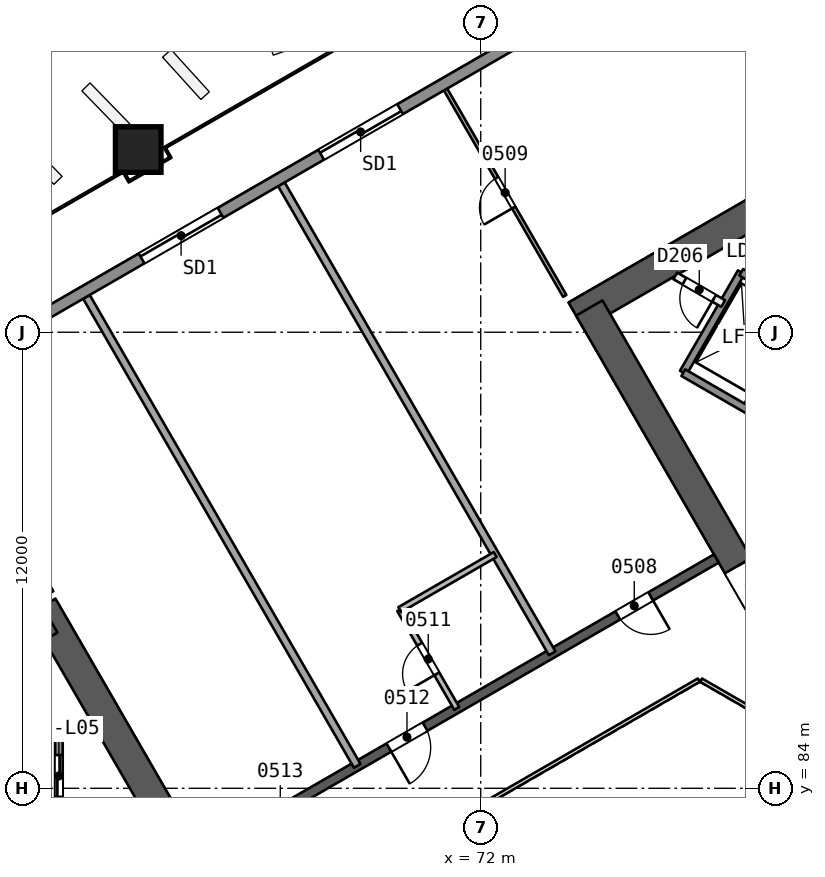
"""IFC4 building model, lengths in metres.
Left out: names, types, materials, properties, quantities, classifications, styles, units other than length and angle.
Written with IfcOpenShell. Run it as: python <this file> out.ifc"""

import sys

from ifc_helpers import new_model, si_unit, direction, frame, frame_2d, origin, origin_2d, place, context, subcontext, project, spatial, rectangle, extrude, element, fill, save


model = new_model("IFC4")
c1 = context("Model", 3, precision=1e-05, world=origin(), true_north=direction((0.0, 1.0)))
c2 = subcontext(c1, "Body", "Model", "MODEL_VIEW")
j1 = project(units=[si_unit("LENGTHUNIT", "METRE"), si_unit("PLANEANGLEUNIT", "RADIAN")], contexts=[c1])
p1 = place(None, origin())
s1 = spatial("IfcSite", under=j1, at=p1, CompositionType="ELEMENT")
p2 = place(p1, origin())
s2 = spatial("IfcBuilding", under=s1, at=p2, CompositionType="ELEMENT")
p3 = place(p2, frame((0.0, 0.0, 30.0)))
s3 = spatial("IfcBuildingStorey", under=s2, at=p3, CompositionType="ELEMENT", Elevation=30.0)
p4 = place(p3, frame((65.538, 80.0, 0.0), z_axis=(0.0, 0.0, 1.0), x_axis=(-0.49999662545, 0.866027352073, 0.0)))
e1 = element("IfcWall", 1, at=p4, inside=s3, PredefinedType="SHEAR", context=c2, shape_type="SweptSolid", body=[
    extrude(rectangle(XDim=10.149, YDim=0.8, at=frame_2d((5.074, 0.0))), origin(), (0.0, 0.0, 1.0), 3.7),
])
p5 = place(p4, frame((0.719, 0.0, 0.0)))
e2 = element("IfcOpeningElement", 2, at=p5, cuts=e1, PredefinedType="OPENING", context=c2, shape_type="SweptSolid", body=[
    extrude(rectangle(XDim=1.2, YDim=2.1, at=frame_2d((0.6, 1.05))), frame((0.0, 0.411, 0.0), z_axis=(0.0, -1.0, 0.0), x_axis=(1.0, 0.0, 0.0)), (0.0, 0.0, 1.0), 0.821),
])
p6 = place(p3, frame((60.664, 88.443, 0.0), z_axis=(0.0, 0.0, 1.0), x_axis=(-0.866029478545, -0.499992942241, 0.0)))
e3 = element("IfcWall", 3, at=p6, inside=s3, PredefinedType="SHEAR", context=c2, shape_type="SweptSolid", body=[
    extrude(rectangle(XDim=13.933, YDim=0.8, at=frame_2d((6.967, 0.0))), origin(), (0.0, 0.0, 1.0), 3.7),
])
p7 = place(p3, frame((86.723, 103.488, 0.0), z_axis=(0.0, 0.0, 1.0), x_axis=(-0.866032504327, -0.499987701298, 0.0)))
e4 = element("IfcWall", 4, at=p7, inside=s3, PredefinedType="SHEAR", context=c2, shape_type="SweptSolid", body=[
    extrude(rectangle(XDim=14.102, YDim=0.8, at=frame_2d((7.051, 0.0))), origin(), (0.0, 0.0, 1.0), 3.7),
])
p8 = place(p3, frame((74.856, 96.637, 0.0), z_axis=(0.0, 0.0, 1.0), x_axis=(0.499993500917, -0.866029155999, 0.0)))
e5 = element("IfcWall", 5, at=p8, inside=s3, PredefinedType="SHEAR", context=c2, shape_type="SweptSolid", body=[
    extrude(rectangle(XDim=9.98, YDim=0.8, at=frame_2d((4.99, 0.0))), origin(), (0.0, 0.0, 1.0), 3.7),
])
p9 = place(p8, frame((7.83, 0.0, 0.0)))
e6 = element("IfcOpeningElement", 6, at=p9, cuts=e5, PredefinedType="OPENING", context=c2, shape_type="SweptSolid", body=[
    extrude(rectangle(XDim=1.2, YDim=2.1, at=frame_2d((0.6, 1.05))), frame((0.0, 0.411, 0.0), z_axis=(0.0, -1.0, 0.0), x_axis=(1.0, 0.0, 0.0)), (0.0, 0.0, 1.0), 0.821),
])
p10 = place(p3, frame((78.2, 90.046, 0.0), z_axis=(0.0, 0.0, 1.0), x_axis=(-0.866026492143, -0.499998114903, 0.0)))
e7 = element("IfcWall", 7, at=p10, inside=s3, PredefinedType="SHEAR", context=c2, shape_type="SweptSolid", body=[
    extrude(rectangle(XDim=15.588, YDim=0.25, at=frame_2d((7.794, 0.0))), origin(), (0.0, 0.0, 1.0), 3.2),
])
p11 = place(p10, frame((1.994, 0.0, 0.0)))
e8 = element("IfcOpeningElement", 8, at=p11, cuts=e7, PredefinedType="OPENING", context=c2, shape_type="SweptSolid", body=[
    extrude(rectangle(XDim=1.0, YDim=2.1, at=frame_2d((0.5, 1.05))), frame((0.0, 0.135, 0.0), z_axis=(0.0, -1.0, 0.0), x_axis=(1.0, 0.0, 0.0)), (0.0, 0.0, 1.0), 0.271),
])
p12 = place(p10, frame((8.85, 0.0, 0.0)))
e9 = element("IfcOpeningElement", 9, at=p12, cuts=e7, PredefinedType="OPENING", context=c2, shape_type="SweptSolid", body=[
    extrude(rectangle(XDim=1.1, YDim=2.1, at=frame_2d((0.55, 1.05))), frame((0.0, 0.135, 0.0), z_axis=(0.0, -1.0, 0.0), x_axis=(1.0, 0.0, 0.0)), (0.0, 0.0, 1.0), 0.271),
])
p13 = place(p10, frame((12.75, 0.0, 0.0)))
e10 = element("IfcOpeningElement", 10, at=p13, cuts=e7, PredefinedType="OPENING", context=c2, shape_type="SweptSolid", body=[
    extrude(rectangle(XDim=1.0, YDim=2.1, at=frame_2d((0.5, 1.05))), frame((0.0, 0.135, 0.0), z_axis=(0.0, -1.0, 0.0), x_axis=(1.0, 0.0, 0.0)), (0.0, 0.0, 1.0), 0.271),
])
p14 = place(p3, frame((62.975, 100.828, 0.0), z_axis=(0.010093620709, -0.017482414954, 0.999796221231), x_axis=(-0.499897086036, 0.865849517735, 0.020187025824)))
e11 = element("IfcColumn", 11, at=p14, inside=s3, PredefinedType="COLUMN", context=c2, shape_type="SweptSolid", body=[
    extrude(rectangle(XDim=1.2, YDim=1.2, at=origin_2d()), origin(), (0.0, 0.0, 1.0), 3.701),
])
p15 = place(p3, frame((74.21, 96.956, 0.0), z_axis=(0.0, 0.0, 1.0), x_axis=(-0.499986391729, 0.866033260381, 0.0)))
e12 = element("IfcWall", 12, at=p15, inside=s3, PredefinedType="PARTITIONING", context=c2, shape_type="SweptSolid", body=[
    extrude(rectangle(XDim=6.272, YDim=0.1, at=frame_2d((3.136, 0.0))), origin(), (0.0, 0.0, 1.0), 3.2),
])
p16 = place(p15, frame((2.686, 0.0, 0.0)))
e13 = element("IfcOpeningElement", 13, at=p16, cuts=e12, PredefinedType="OPENING", context=c2, shape_type="SweptSolid", body=[
    extrude(rectangle(XDim=0.9, YDim=2.1, at=frame_2d((0.45, 1.05))), frame((0.0, 0.061, 0.0), z_axis=(0.0, -1.0, 0.0), x_axis=(1.0, 0.0, 0.0)), (0.0, 0.0, 1.0), 0.121),
])
p17 = place(p3, frame((66.754, 99.894, 0.0), z_axis=(0.0, 0.0, 1.0), x_axis=(0.499997291418, -0.866026967579, 0.0)))
e14 = element("IfcWall", 14, at=p17, inside=s3, PredefinedType="PARTITIONING", context=c2, shape_type="SweptSolid", body=[
    extrude(rectangle(XDim=14.251, YDim=0.2, at=frame_2d((7.125, 0.0))), origin(), (0.0, 0.0, 1.0), 3.2),
])
p18 = place(p3, frame((71.368, 86.102, 0.0), z_axis=(0.0, 0.0, 1.0), x_axis=(-0.50002537861, 0.866010750942, 0.0)))
e15 = element("IfcWall", 15, at=p18, inside=s3, PredefinedType="PARTITIONING", context=c2, shape_type="SweptSolid", body=[
    extrude(rectangle(XDim=3.0, YDim=0.15, at=frame_2d((1.5, 0.0))), origin(), (0.0, 0.0, 1.0), 3.2),
])
p19 = place(p18, frame((1.05, 0.0, 0.0)))
e16 = element("IfcOpeningElement", 16, at=p19, cuts=e15, PredefinedType="OPENING", context=c2, shape_type="SweptSolid", body=[
    extrude(rectangle(XDim=0.9, YDim=2.1, at=frame_2d((0.45, 1.05))), frame((0.0, 0.085, 0.0), z_axis=(0.0, -1.0, 0.0), x_axis=(1.0, 0.0, 0.0)), (0.0, 0.0, 1.0), 0.171),
])
p20 = place(p3, frame((69.868, 88.7, 0.0), z_axis=(0.0, 0.0, 1.0), x_axis=(0.865996321171, 0.50005036918, 0.0)))
e17 = element("IfcWall", 17, at=p20, inside=s3, PredefinedType="PARTITIONING", context=c2, shape_type="SweptSolid", body=[
    extrude(rectangle(XDim=2.9, YDim=0.15, at=frame_2d((1.45, 0.0))), origin(), (0.0, 0.0, 1.0), 3.2),
])
p21 = place(p3, frame((61.625, 96.932, 0.0), z_axis=(0.0, 0.0, 1.0), x_axis=(0.499997291418, -0.866026967579, 0.0)))
e18 = element("IfcWall", 18, at=p21, inside=s3, PredefinedType="PARTITIONING", context=c2, shape_type="SweptSolid", body=[
    extrude(rectangle(XDim=14.251, YDim=0.2, at=frame_2d((7.125, 0.0))), origin(), (0.0, 0.0, 1.0), 3.2),
])
p22 = place(p3, frame((57.574, 94.594, 0.0), z_axis=(0.0, 0.0, 1.0), x_axis=(0.499986391729, -0.866033260381, 0.0)))
e19 = element("IfcWall", 19, at=p22, inside=s3, PredefinedType="PARTITIONING", context=c2, shape_type="SweptSolid", body=[
    extrude(rectangle(XDim=6.272, YDim=0.1, at=frame_2d((3.136, 0.0))), origin(), (0.0, 0.0, 1.0), 3.2),
])
p23 = place(p22, frame((2.686, 0.0, 0.0)))
e20 = element("IfcOpeningElement", 20, at=p23, cuts=e19, PredefinedType="OPENING", context=c2, shape_type="SweptSolid", body=[
    extrude(rectangle(XDim=0.9, YDim=2.1, at=frame_2d((0.45, 1.05))), frame((0.0, 0.061, 0.0), z_axis=(0.0, -1.0, 0.0), x_axis=(1.0, 0.0, 0.0)), (0.0, 0.0, 1.0), 0.121),
])
p24 = place(p3, frame((37.479, 83.163, 0.0), z_axis=(0.0, 0.0, 1.0), x_axis=(0.866024340432, 0.500001841776, 0.0)))
e21 = element("IfcWall", 21, at=p24, inside=s3, PredefinedType="SOLIDWALL", context=c2, shape_type="SweptSolid", body=[
    extrude(rectangle(XDim=61.824, YDim=0.3, at=frame_2d((30.912, 0.0))), origin(), (0.0, 0.0, 1.0), 3.2),
])
p25 = place(p24, frame((29.556, 0.0, 0.0)))
e22 = element("IfcOpeningElement", 22, at=p25, cuts=e21, PredefinedType="OPENING", context=c2, shape_type="SweptSolid", body=[
    extrude(rectangle(XDim=2.4, YDim=2.4, at=frame_2d((1.2, 1.2))), frame((0.0, 0.161, 0.0), z_axis=(0.0, -1.0, 0.0), x_axis=(1.0, 0.0, 0.0)), (0.0, 0.0, 1.0), 0.321),
])
p26 = place(p24, frame((35.012, 0.0, 0.0)))
e23 = element("IfcOpeningElement", 23, at=p26, cuts=e21, PredefinedType="OPENING", context=c2, shape_type="SweptSolid", body=[
    extrude(rectangle(XDim=2.4, YDim=2.4, at=frame_2d((1.2, 1.2))), frame((0.0, 0.161, 0.0), z_axis=(0.0, -1.0, 0.0), x_axis=(1.0, 0.0, 0.0)), (0.0, 0.0, 1.0), 0.321),
])
p27 = place(p24, frame((47.93, 0.0, 0.0)))
e24 = element("IfcOpeningElement", 24, at=p27, cuts=e21, PredefinedType="OPENING", context=c2, shape_type="SweptSolid", body=[
    extrude(rectangle(XDim=2.4, YDim=2.4, at=frame_2d((1.2, 1.2))), frame((0.0, 0.161, 0.0), z_axis=(0.0, -1.0, 0.0), x_axis=(1.0, 0.0, 0.0)), (0.0, 0.0, 1.0), 0.321),
])
p28 = place(p24, frame((24.256, 0.0, 0.0)))
e25 = element("IfcOpeningElement", 25, at=p28, cuts=e21, PredefinedType="OPENING", context=c2, shape_type="SweptSolid", body=[
    extrude(rectangle(XDim=2.4, YDim=2.4, at=frame_2d((1.2, 1.2))), frame((0.0, 0.161, 0.0), z_axis=(0.0, -1.0, 0.0), x_axis=(1.0, 0.0, 0.0)), (0.0, 0.0, 1.0), 0.321),
])
p29 = place(p24, frame((11.509, 0.0, 0.0)))
e26 = element("IfcOpeningElement", 26, at=p29, cuts=e21, PredefinedType="OPENING", context=c2, shape_type="SweptSolid", body=[
    extrude(rectangle(XDim=2.4, YDim=2.4, at=frame_2d((1.2, 1.2))), frame((0.0, 0.161, 0.0), z_axis=(0.0, -1.0, 0.0), x_axis=(1.0, 0.0, 0.0)), (0.0, 0.0, 1.0), 0.321),
])
p30 = place(p3, frame((60.9, 85.45, 0.0), z_axis=(0.0, 0.0, 1.0), x_axis=(-1.0, 0.0, 0.0)))
e27 = element("IfcWall", 27, at=p30, inside=s3, PredefinedType="SOLIDWALL", context=c2, shape_type="SweptSolid", body=[
    extrude(rectangle(XDim=2.48, YDim=0.2, at=frame_2d((1.24, 0.0))), origin(), (0.0, 0.0, 1.0), 3.2),
])
p31 = place(p3, frame((60.9, 85.45, 0.0), z_axis=(0.0, 0.0, 1.0), x_axis=(0.0, -1.0, 0.0)))
e28 = element("IfcWall", 28, at=p31, inside=s3, PredefinedType="SOLIDWALL", context=c2, shape_type="SweptSolid", body=[
    extrude(rectangle(XDim=10.9, YDim=0.2, at=frame_2d((5.45, 0.0))), origin(), (0.0, 0.0, 1.0), 3.2),
])
p32 = place(p31, frame((0.575, 0.0, 0.0)))
e29 = element("IfcOpeningElement", 29, at=p32, cuts=e28, PredefinedType="OPENING", context=c2, shape_type="SweptSolid", body=[
    extrude(rectangle(XDim=1.1, YDim=2.1, at=frame_2d((0.55, 1.05))), frame((0.0, 0.11, 0.0), z_axis=(0.0, -1.0, 0.0), x_axis=(1.0, 0.0, 0.0)), (0.0, 0.0, 1.0), 0.221),
])
p33 = place(p31, frame((2.825, 0.0, 0.0)))
e30 = element("IfcOpeningElement", 30, at=p33, cuts=e28, PredefinedType="OPENING", context=c2, shape_type="SweptSolid", body=[
    extrude(rectangle(XDim=1.1, YDim=2.1, at=frame_2d((0.55, 1.05))), frame((0.0, 0.11, 0.0), z_axis=(0.0, -1.0, 0.0), x_axis=(1.0, 0.0, 0.0)), (0.0, 0.0, 1.0), 0.221),
])
p34 = place(p31, frame((5.075, 0.0, 0.0)))
e31 = element("IfcOpeningElement", 31, at=p34, cuts=e28, PredefinedType="OPENING", context=c2, shape_type="SweptSolid", body=[
    extrude(rectangle(XDim=1.1, YDim=2.1, at=frame_2d((0.55, 1.05))), frame((0.0, 0.11, 0.0), z_axis=(0.0, -1.0, 0.0), x_axis=(1.0, 0.0, 0.0)), (0.0, 0.0, 1.0), 0.221),
])
p35 = place(p31, frame((7.325, 0.0, 0.0)))
e32 = element("IfcOpeningElement", 32, at=p35, cuts=e28, PredefinedType="OPENING", context=c2, shape_type="SweptSolid", body=[
    extrude(rectangle(XDim=1.1, YDim=2.1, at=frame_2d((0.55, 1.05))), frame((0.0, 0.11, 0.0), z_axis=(0.0, -1.0, 0.0), x_axis=(1.0, 0.0, 0.0)), (0.0, 0.0, 1.0), 0.221),
])
for number, where, z_axis, x_axis in (
    (33, (78.976, 93.986, 0.0), (0.0, 0.0, 1.0), (0.5, 0.866, 0.0)),
    (34, (77.33, 94.936, 0.0), (0.0, 0.0, 1.0), (0.5, 0.866, 0.0)),
):
    element("IfcWall", number, at=place(p3, frame(where, z_axis=z_axis, x_axis=x_axis)), inside=s3, PredefinedType="SOLIDWALL", context=c2, shape_type="SweptSolid", body=[
        extrude(rectangle(XDim=3.05, YDim=0.2, at=frame_2d((1.525, 0.0))), origin(), (0.0, 0.0, 1.0), 3.2),
    ])
p36 = place(p3, frame((86.77, 89.486, 0.0), z_axis=(0.0, 0.0, 1.0), x_axis=(-0.86601811187, 0.500012629753, 0.0)))
e35 = element("IfcWall", 35, at=p36, inside=s3, PredefinedType="SOLIDWALL", context=c2, shape_type="SweptSolid", body=[
    extrude(rectangle(XDim=10.9, YDim=0.2, at=frame_2d((5.45, 0.0))), origin(), (0.0, 0.0, 1.0), 3.2),
])
p37 = place(p3, frame((78.38, 96.755, 0.0), z_axis=(0.0, 0.0, 1.0), x_axis=(-0.866003949776, 0.500037157592, 0.0)))
e36 = element("IfcWall", 36, at=p37, inside=s3, PredefinedType="PARTITIONING", context=c2, shape_type="SweptSolid", body=[
    extrude(rectangle(XDim=1.455, YDim=0.2, at=frame_2d((0.728, 0.0))), origin(), (0.0, 0.0, 1.0), 3.2),
])
p38 = place(p37, frame((0.278, 0.0, 0.0)))
e37 = element("IfcOpeningElement", 37, at=p38, cuts=e36, PredefinedType="OPENING", context=c2, shape_type="SweptSolid", body=[
    extrude(rectangle(XDim=0.9, YDim=2.1, at=frame_2d((0.45, 1.05))), frame((0.0, 0.11, 0.0), z_axis=(0.0, -1.0, 0.0), x_axis=(1.0, 0.0, 0.0)), (0.0, 0.0, 1.0), 0.221),
])
p39 = place(p3, frame((80.5, 96.627, 0.0), z_axis=(0.0, 0.0, 1.0), x_axis=(-0.86601224135, 0.500022797313, 0.0)))
e38 = element("IfcWall", 38, at=p39, inside=s3, PredefinedType="SOLIDWALL", context=c2, shape_type="SweptSolid", body=[
    extrude(rectangle(XDim=1.9, YDim=0.2, at=frame_2d((0.95, 0.0))), origin(), (0.0, 0.0, 1.0), 3.2),
])
p40 = place(p39, frame((0.4, 0.0, 0.0)))
e39 = element("IfcOpeningElement", 39, at=p40, cuts=e38, PredefinedType="OPENING", context=c2, shape_type="SweptSolid", body=[
    extrude(rectangle(XDim=1.1, YDim=2.1, at=frame_2d((0.55, 1.05))), frame((0.0, 0.11, 0.0), z_axis=(0.0, -1.0, 0.0), x_axis=(1.0, 0.0, 0.0)), (0.0, 0.0, 1.0), 0.221),
])
p41 = place(p3, frame((79.53, 85.846, 0.0), z_axis=(0.0, 0.0, 1.0), x_axis=(-0.866041268327, 0.499972520799, 0.0)))
e40 = element("IfcWall", 40, at=p41, inside=s3, PredefinedType="PARTITIONING", context=c2, shape_type="SweptSolid", body=[
    extrude(rectangle(XDim=2.0, YDim=0.1, at=frame_2d((1.0, 0.0))), origin(), (0.0, 0.0, 1.0), 3.2),
])
p42 = place(p3, frame((77.738, 86.846, 0.0), z_axis=(0.0, 0.0, 1.0), x_axis=(-0.866026658274, -0.499997827154, 0.0)))
e41 = element("IfcWall", 41, at=p42, inside=s3, PredefinedType="PARTITIONING", context=c2, shape_type="SweptSolid", body=[
    extrude(rectangle(XDim=11.588, YDim=0.1, at=frame_2d((5.794, 0.0))), origin(), (0.0, 0.0, 1.0), 3.2),
])
p43 = place(p11, origin())
e42 = element("IfcDoor", 42, at=p43, inside=s3, OperationType="SINGLE_SWING_LEFT", PredefinedType="NOTDEFINED", context=c2, shape_type="SweptSolid", body=[
    extrude(rectangle(XDim=1.0, YDim=2.1, at=frame_2d((0.5, 1.05))), frame((0.0, 0.025, 0.0), z_axis=(0.0, -1.0, 0.0), x_axis=(1.0, 0.0, 0.0)), (0.0, 0.0, 1.0), 0.05),
])
fill(e8, e42)
p44 = place(p16, origin())
e43 = element("IfcDoor", 43, at=p44, inside=s3, OperationType="SINGLE_SWING_LEFT", PredefinedType="NOTDEFINED", context=c2, shape_type="SweptSolid", body=[
    extrude(rectangle(XDim=0.9, YDim=2.1, at=frame_2d((0.45, 1.05))), frame((0.0, 0.025, 0.0), z_axis=(0.0, -1.0, 0.0), x_axis=(1.0, 0.0, 0.0)), (0.0, 0.0, 1.0), 0.05),
])
fill(e13, e43)
p45 = place(p19, origin())
e44 = element("IfcDoor", 44, at=p45, inside=s3, OperationType="SINGLE_SWING_LEFT", PredefinedType="NOTDEFINED", context=c2, shape_type="SweptSolid", body=[
    extrude(rectangle(XDim=0.9, YDim=2.1, at=frame_2d((0.45, 1.05))), frame((0.0, 0.025, 0.0), z_axis=(0.0, -1.0, 0.0), x_axis=(1.0, 0.0, 0.0)), (0.0, 0.0, 1.0), 0.05),
])
fill(e16, e44)
p46 = place(p12, origin())
e45 = element("IfcDoor", 45, at=p46, inside=s3, OperationType="SINGLE_SWING_RIGHT", PredefinedType="NOTDEFINED", context=c2, shape_type="SweptSolid", body=[
    extrude(rectangle(XDim=1.1, YDim=2.1, at=frame_2d((0.55, 1.05))), frame((0.0, 0.025, 0.0), z_axis=(0.0, -1.0, 0.0), x_axis=(1.0, 0.0, 0.0)), (0.0, 0.0, 1.0), 0.05),
])
fill(e9, e45)
p47 = place(p25, origin())
e46 = element("IfcDoor", 46, at=p47, inside=s3, OperationType="SLIDING_TO_LEFT", PredefinedType="NOTDEFINED", context=c2, shape_type="SweptSolid", body=[
    extrude(rectangle(XDim=2.4, YDim=2.4, at=frame_2d((1.2, 1.2))), frame((0.0, 0.025, 0.0), z_axis=(0.0, -1.0, 0.0), x_axis=(1.0, 0.0, 0.0)), (0.0, 0.0, 1.0), 0.05),
])
fill(e22, e46)
p48 = place(p26, origin())
e47 = element("IfcDoor", 47, at=p48, inside=s3, OperationType="SLIDING_TO_RIGHT", PredefinedType="NOTDEFINED", context=c2, shape_type="SweptSolid", body=[
    extrude(rectangle(XDim=2.4, YDim=2.4, at=frame_2d((1.2, 1.2))), frame((0.0, 0.025, 0.0), z_axis=(0.0, -1.0, 0.0), x_axis=(1.0, 0.0, 0.0)), (0.0, 0.0, 1.0), 0.05),
])
fill(e23, e47)
p49 = place(p32, origin())
e48 = element("IfcDoor", 48, at=p49, inside=s3, OperationType="SLIDING_TO_RIGHT", PredefinedType="NOTDEFINED", context=c2, shape_type="SweptSolid", body=[
    extrude(rectangle(XDim=1.1, YDim=2.1, at=frame_2d((0.55, 1.05))), frame((0.0, 0.025, 0.0), z_axis=(0.0, -1.0, 0.0), x_axis=(1.0, 0.0, 0.0)), (0.0, 0.0, 1.0), 0.05),
])
fill(e29, e48)
p50 = place(p9, origin())
e49 = element("IfcDoor", 49, at=p50, inside=s3, OperationType="SINGLE_SWING_LEFT", PredefinedType="NOTDEFINED", context=c2, shape_type="SweptSolid", body=[
    extrude(rectangle(XDim=1.2, YDim=2.1, at=frame_2d((0.6, 1.05))), frame((0.0, 0.025, 0.0), z_axis=(0.0, -1.0, 0.0), x_axis=(1.0, 0.0, 0.0)), (0.0, 0.0, 1.0), 0.05),
])
fill(e6, e49)
p51 = place(p38, origin())
e50 = element("IfcDoor", 50, at=p51, inside=s3, OperationType="SINGLE_SWING_LEFT", PredefinedType="NOTDEFINED", context=c2, shape_type="SweptSolid", body=[
    extrude(rectangle(XDim=0.9, YDim=2.1, at=frame_2d((0.45, 1.05))), frame((0.0, 0.025, 0.0), z_axis=(0.0, -1.0, 0.0), x_axis=(1.0, 0.0, 0.0)), (0.0, 0.0, 1.0), 0.05),
])
fill(e37, e50)
save(model, sys.argv[1])
